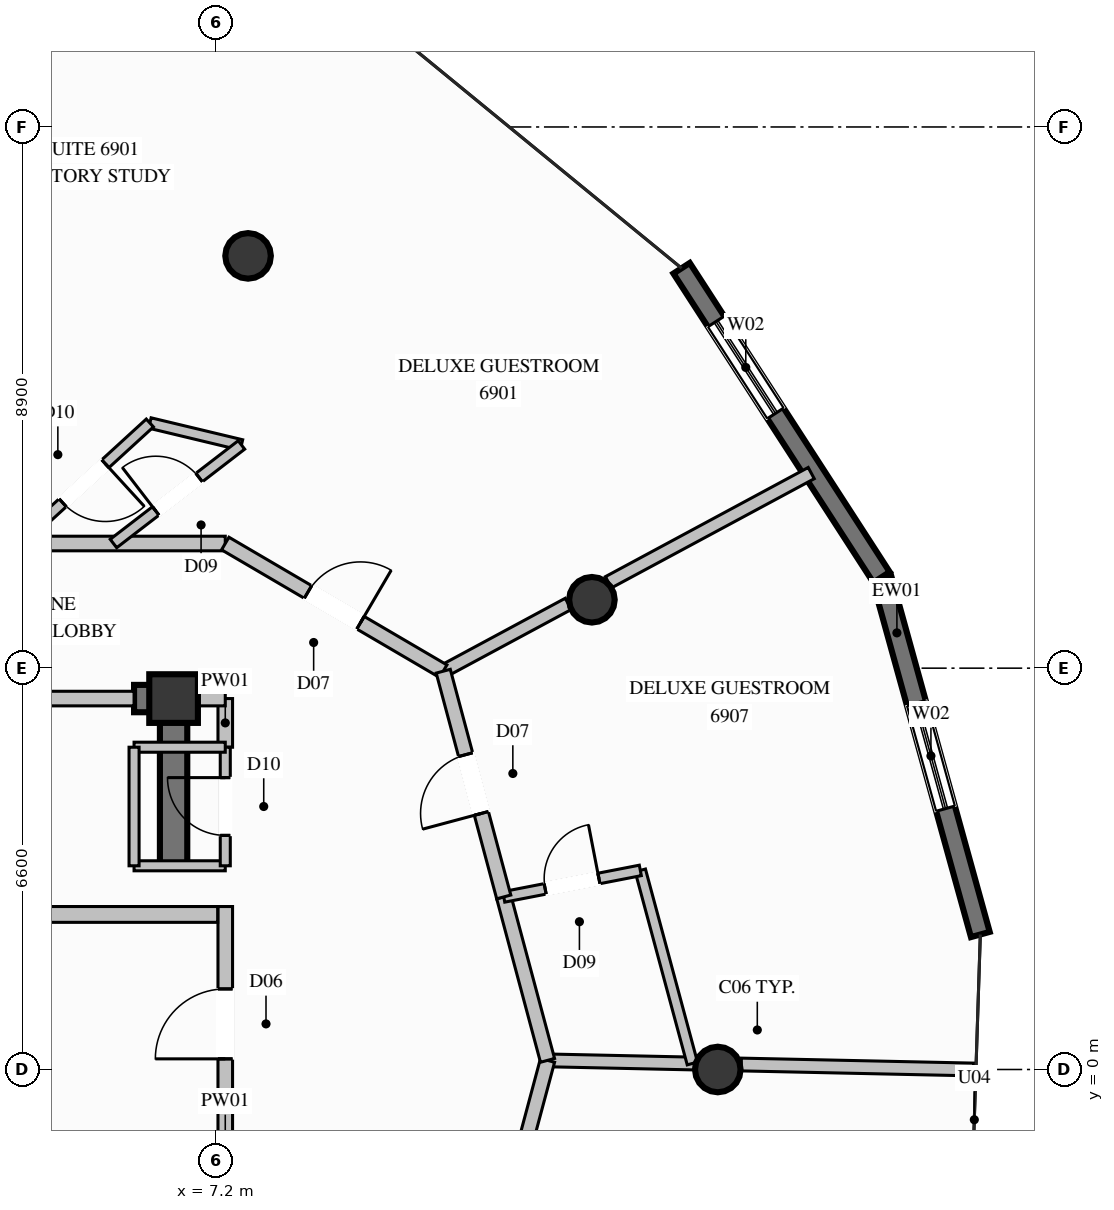
"""IFC4 building model, lengths in metres.
Left out: names, types, materials, properties, quantities, classifications, styles, units other than length and angle.
Written with IfcOpenShell. Run it as: python <this file> out.ifc"""

import sys

from ifc_helpers import new_model, si_unit, direction, frame, frame_2d, origin, origin_2d, place, context, subcontext, project, spatial, rectangle, circle, extrude, element, fill, save


model = new_model("IFC4")
c1 = context("Model", 3, precision=1e-05, world=origin(), true_north=direction((0.0, 1.0)))
c2 = subcontext(c1, "Body", "Model", "MODEL_VIEW")
j1 = project(units=[si_unit("LENGTHUNIT", "METRE"), si_unit("PLANEANGLEUNIT", "RADIAN")], contexts=[c1])
p1 = place(None, origin())
s1 = spatial("IfcSite", under=j1, at=p1, CompositionType="ELEMENT")
p2 = place(p1, origin())
s2 = spatial("IfcBuilding", under=s1, at=p2, CompositionType="ELEMENT")
p3 = place(p2, frame((0.0, 0.0, 258.2)))
s3 = spatial("IfcBuildingStorey", under=s2, at=p3, CompositionType="ELEMENT", Elevation=258.2)
p4 = place(p3, frame((6.5, 6.1, 0.0), z_axis=(0.0, 0.0, 1.0), x_axis=(1.0, 0.0, 0.0)))
e1 = element("IfcColumn", 1, at=p4, inside=s3, PredefinedType="COLUMN", context=c2, shape_type="SweptSolid", body=[
    extrude(rectangle(XDim=0.8, YDim=0.8, at=origin_2d()), origin(), (0.0, 0.0, 1.0), 3.8),
])
p5 = place(p3, frame((5.85, 6.1, 0.0), z_axis=(0.0, 0.0, 1.0), x_axis=(1.0, 0.0, 0.0)))
e2 = element("IfcWall", 2, at=p5, inside=s3, PredefinedType="SHEAR", context=c2, shape_type="SweptSolid", body=[
    extrude(rectangle(XDim=0.425, YDim=0.45, at=frame_2d((0.212, 0.0))), origin(), (0.0, 0.0, 1.0), 3.8),
])
p6 = place(p3, frame((6.5, 3.35, 0.0), z_axis=(0.0, 0.0, 1.0), x_axis=(0.0, 1.0, 0.0)))
e3 = element("IfcWall", 3, at=p6, inside=s3, PredefinedType="SHEAR", context=c2, shape_type="SweptSolid", body=[
    extrude(rectangle(XDim=2.975, YDim=0.45, at=frame_2d((1.487, 0.0))), origin(), (0.0, 0.0, 1.0), 3.8),
])
for number, where, z_axis, x_axis in (
    (4, (15.45, 0.0, 0.0), (0.0, 0.0, 1.0), (1.0, 0.0, 0.0)),
    (5, (13.38, 7.725, 0.0), (0.0, 0.0, 1.0), (1.0, 0.0, 0.0)),
    (6, (7.725, 13.38, 0.0), (0.0, 0.0, 1.0), (1.0, 0.0, 0.0)),
):
    element("IfcColumn", number, at=place(p3, frame(where, z_axis=z_axis, x_axis=x_axis)), inside=s3, PredefinedType="COLUMN", context=c2, shape_type="SweptSolid", body=[
        extrude(circle(Radius=0.375, at=origin_2d()), origin(), (0.0, 0.0, 1.0), 3.8),
    ])
p7 = place(p3, frame((18.143, 8.095, 0.0), z_axis=(0.0, 0.0, 1.0), x_axis=(0.266586054538, -0.963811120254, 0.0)))
e7 = element("IfcWall", 7, at=p7, inside=s3, PredefinedType="SOLIDWALL", context=c2, shape_type="SweptSolid", body=[
    extrude(rectangle(XDim=6.096, YDim=0.32, at=frame_2d((3.048, 0.0))), origin(), (0.0, 0.0, 1.0), 3.57),
])
p8 = place(p7, frame((2.148, 0.0, 0.35)))
e8 = element("IfcOpeningElement", 8, at=p8, cuts=e7, PredefinedType="OPENING", context=c2, shape_type="SweptSolid", body=[
    extrude(rectangle(XDim=1.8, YDim=2.6, at=frame_2d((0.9, 1.3))), frame((0.0, 0.17, 0.0), z_axis=(0.0, -1.0, 0.0), x_axis=(1.0, 0.0, 0.0)), (0.0, 0.0, 1.0), 0.34),
])
p9 = place(p3, frame((14.855, 13.177, 0.0), z_axis=(0.0, 0.0, 1.0), x_axis=(0.543217830049, -0.839591799101, 0.0)))
e9 = element("IfcWall", 9, at=p9, inside=s3, PredefinedType="SOLIDWALL", context=c2, shape_type="SweptSolid", body=[
    extrude(rectangle(XDim=6.053, YDim=0.32, at=frame_2d((3.026, 0.0))), origin(), (0.0, 0.0, 1.0), 3.57),
])
p10 = place(p9, frame((1.043, 0.0, 0.35)))
e10 = element("IfcOpeningElement", 10, at=p10, cuts=e9, PredefinedType="OPENING", context=c2, shape_type="SweptSolid", body=[
    extrude(rectangle(XDim=1.8, YDim=2.6, at=frame_2d((0.9, 1.3))), frame((0.0, 0.17, 0.0), z_axis=(0.0, -1.0, 0.0), x_axis=(1.0, 0.0, 0.0)), (0.0, 0.0, 1.0), 0.34),
])
p11 = place(p3, frame((7.35, -2.34, 0.0), z_axis=(0.0, 0.0, 1.0), x_axis=(0.0, 1.0, 0.0)))
e11 = element("IfcWall", 11, at=p11, inside=s3, PredefinedType="PARTITIONING", context=c2, shape_type="SweptSolid", body=[
    extrude(rectangle(XDim=5.02, YDim=0.24, at=frame_2d((2.51, 0.0))), origin(), (0.0, 0.0, 1.0), 2.655),
])
p12 = place(p11, frame((2.515, 0.0, 0.0)))
e12 = element("IfcOpeningElement", 12, at=p12, cuts=e11, PredefinedType="OPENING", context=c2, shape_type="SweptSolid", body=[
    extrude(rectangle(XDim=1.15, YDim=2.2, at=frame_2d((0.575, 1.1))), frame((0.0, 0.13, 0.0), z_axis=(0.0, -1.0, 0.0), x_axis=(1.0, 0.0, 0.0)), (0.0, 0.0, 1.0), 0.26),
])
p13 = place(p3, frame((4.13, 2.55, 0.0), z_axis=(0.0, 0.0, 1.0), x_axis=(1.0, 0.0, 0.0)))
e13 = element("IfcWall", 13, at=p13, inside=s3, PredefinedType="PARTITIONING", context=c2, shape_type="SweptSolid", body=[
    extrude(rectangle(XDim=3.095, YDim=0.26, at=frame_2d((1.548, 0.0))), origin(), (0.0, 0.0, 1.0), 3.57),
])
p14 = place(p3, frame((-5.75, 8.65, 0.0), z_axis=(0.0, 0.0, 1.0), x_axis=(1.0, 0.0, 0.0)))
e14 = element("IfcWall", 14, at=p14, inside=s3, PredefinedType="PARTITIONING", context=c2, shape_type="SweptSolid", body=[
    extrude(rectangle(XDim=13.1, YDim=0.24, at=frame_2d((6.55, 0.0))), origin(), (0.0, 0.0, 1.0), 3.57),
])
p15 = place(p3, frame((3.0, 6.1, 0.0), z_axis=(0.0, 0.0, 1.0), x_axis=(1.0, 0.0, 0.0)))
e15 = element("IfcWall", 15, at=p15, inside=s3, PredefinedType="PARTITIONING", context=c2, shape_type="SweptSolid", body=[
    extrude(rectangle(XDim=2.85, YDim=0.24, at=frame_2d((1.425, 0.0))), origin(), (0.0, 0.0, 1.0), 2.655),
])
p16 = place(p3, frame((7.35, 5.3, 0.0), z_axis=(0.0, 0.0, 1.0), x_axis=(0.0, 1.0, 0.0)))
e16 = element("IfcWall", 16, at=p16, inside=s3, PredefinedType="PARTITIONING", context=c2, shape_type="SweptSolid", body=[
    extrude(rectangle(XDim=0.8, YDim=0.24, at=frame_2d((0.4, 0.0))), origin(), (0.0, 0.0, 1.0), 2.655),
])
p17 = place(p3, frame((6.5, 6.1, 0.0), z_axis=(0.0, 0.0, 1.0), x_axis=(1.0, 0.0, 0.0)))
e17 = element("IfcWall", 17, at=p17, inside=s3, PredefinedType="PARTITIONING", context=c2, shape_type="SweptSolid", body=[
    extrude(rectangle(XDim=0.85, YDim=0.24, at=frame_2d((0.425, 0.0))), origin(), (0.0, 0.0, 1.0), 3.085),
])
p18 = place(p3, frame((5.85, 3.35, 0.0), z_axis=(0.0, 0.0, 1.0), x_axis=(1.0, 0.0, 0.0)))
e18 = element("IfcWall", 18, at=p18, inside=s3, PredefinedType="PARTITIONING", context=c2, shape_type="SweptSolid", body=[
    extrude(rectangle(XDim=1.5, YDim=0.165, at=frame_2d((0.75, 0.0))), origin(), (0.0, 0.0, 1.0), 3.57),
])
p19 = place(p3, frame((7.35, 3.35, 0.0), z_axis=(0.0, 0.0, 1.0), x_axis=(0.0, 1.0, 0.0)))
e19 = element("IfcWall", 19, at=p19, inside=s3, PredefinedType="PARTITIONING", context=c2, shape_type="SweptSolid", body=[
    extrude(rectangle(XDim=1.95, YDim=0.165, at=frame_2d((0.975, 0.0))), origin(), (0.0, 0.0, 1.0), 3.57),
])
p20 = place(p19, frame((0.5, 0.0, 0.0)))
e20 = element("IfcOpeningElement", 20, at=p20, cuts=e19, PredefinedType="OPENING", context=c2, shape_type="SweptSolid", body=[
    extrude(rectangle(XDim=0.95, YDim=2.1, at=frame_2d((0.475, 1.05))), frame((0.0, 0.093, 0.0), z_axis=(0.0, -1.0, 0.0), x_axis=(1.0, 0.0, 0.0)), (0.0, 0.0, 1.0), 0.185),
])
p21 = place(p3, frame((7.35, 5.3, 0.0), z_axis=(0.0, 0.0, 1.0), x_axis=(-1.0, 0.0, 0.0)))
e21 = element("IfcWall", 21, at=p21, inside=s3, PredefinedType="PARTITIONING", context=c2, shape_type="SweptSolid", body=[
    extrude(rectangle(XDim=1.5, YDim=0.165, at=frame_2d((0.75, 0.0))), origin(), (0.0, 0.0, 1.0), 2.655),
])
p22 = place(p3, frame((5.85, 5.3, 0.0), z_axis=(0.0, 0.0, 1.0), x_axis=(0.0, -1.0, 0.0)))
e22 = element("IfcWall", 22, at=p22, inside=s3, PredefinedType="PARTITIONING", context=c2, shape_type="SweptSolid", body=[
    extrude(rectangle(XDim=1.95, YDim=0.165, at=frame_2d((0.975, 0.0))), origin(), (0.0, 0.0, 1.0), 2.655),
])
p23 = place(p3, frame((12.65, 0.15, 0.0), z_axis=(0.0, 0.0, 1.0), x_axis=(0.999768629451, -0.021510173543, 0.0)))
e23 = element("IfcWall", 23, at=p23, inside=s3, PredefinedType="PARTITIONING", context=c2, shape_type="SweptSolid", body=[
    extrude(rectangle(XDim=2.417, YDim=0.21, at=frame_2d((1.209, 0.0))), origin(), (0.0, 0.0, 1.0), 3.57),
])
p24 = place(p3, frame((15.836, 0.082, 0.0), z_axis=(0.0, 0.0, 1.0), x_axis=(0.999769518417, -0.021468815632, 0.0)))
e24 = element("IfcWall", 24, at=p24, inside=s3, PredefinedType="PARTITIONING", context=c2, shape_type="SweptSolid", body=[
    extrude(rectangle(XDim=3.821, YDim=0.21, at=frame_2d((1.911, 0.0))), origin(), (0.0, 0.0, 1.0), 3.57),
])
p25 = place(p3, frame((10.935, 6.55, 0.0), z_axis=(0.0, 0.0, 1.0), x_axis=(0.8804878863, 0.474068647011, 0.0)))
e25 = element("IfcWall", 25, at=p25, inside=s3, PredefinedType="PARTITIONING", context=c2, shape_type="SweptSolid", body=[
    extrude(rectangle(XDim=2.335, YDim=0.21, at=frame_2d((1.167, 0.0))), origin(), (0.0, 0.0, 1.0), 3.085),
])
p26 = place(p3, frame((13.651, 8.012, 0.0), z_axis=(0.0, 0.0, 1.0), x_axis=(0.880500064333, 0.47404602805, 0.0)))
e26 = element("IfcWall", 26, at=p26, inside=s3, PredefinedType="PARTITIONING", context=c2, shape_type="SweptSolid", body=[
    extrude(rectangle(XDim=3.789, YDim=0.21, at=frame_2d((1.895, 0.0))), origin(), (0.0, 0.0, 1.0), 3.57),
])
p27 = place(p3, frame((6.11, 10.632, 0.0), z_axis=(0.0, 0.0, 1.0), x_axis=(0.972434507915, -0.233176173347, 0.0)))
e27 = element("IfcWall", 27, at=p27, inside=s3, PredefinedType="PLUMBINGWALL", context=c2, shape_type="SweptSolid", body=[
    extrude(rectangle(XDim=1.549, YDim=0.175, at=frame_2d((0.774, 0.0))), origin(), (0.0, 0.0, 1.0), 3.57),
])
p28 = place(p3, frame((6.11, 10.632, 0.0), z_axis=(0.0, 0.0, 1.0), x_axis=(-0.737719939181, -0.675106874009, 0.0)))
e28 = element("IfcWall", 28, at=p28, inside=s3, PredefinedType="PLUMBINGWALL", context=c2, shape_type="SweptSolid", body=[
    extrude(rectangle(XDim=2.936, YDim=0.175, at=frame_2d((1.468, 0.0))), origin(), (0.0, 0.0, 1.0), 3.57),
])
p29 = place(p28, frame((0.993, 0.0, 0.0)))
e29 = element("IfcOpeningElement", 29, at=p29, cuts=e28, PredefinedType="OPENING", context=c2, shape_type="SweptSolid", body=[
    extrude(rectangle(XDim=0.95, YDim=2.1, at=frame_2d((0.475, 1.05))), frame((0.0, 0.098, 0.0), z_axis=(0.0, -1.0, 0.0), x_axis=(1.0, 0.0, 0.0)), (0.0, 0.0, 1.0), 0.195),
])
p30 = place(p3, frame((5.511, 8.65, 0.0), z_axis=(0.0, 0.0, 1.0), x_axis=(0.792282263308, 0.610154746969, 0.0)))
e30 = element("IfcWall", 30, at=p30, inside=s3, PredefinedType="PLUMBINGWALL", context=c2, shape_type="SweptSolid", body=[
    extrude(rectangle(XDim=2.657, YDim=0.175, at=frame_2d((1.328, 0.0))), origin(), (0.0, 0.0, 1.0), 3.57),
])
p31 = place(p30, frame((0.878, 0.0, 0.0)))
e31 = element("IfcOpeningElement", 31, at=p31, cuts=e30, PredefinedType="OPENING", context=c2, shape_type="SweptSolid", body=[
    extrude(rectangle(XDim=0.9, YDim=2.1, at=frame_2d((0.45, 1.05))), frame((0.0, 0.098, 0.0), z_axis=(0.0, -1.0, 0.0), x_axis=(1.0, 0.0, 0.0)), (0.0, 0.0, 1.0), 0.195),
])
p32 = place(p3, frame((7.35, 8.65, 0.0), z_axis=(0.0, 0.0, 1.0), x_axis=(0.862873842462, -0.505419362505, 0.0)))
e32 = element("IfcWall", 32, at=p32, inside=s3, PredefinedType="PARTITIONING", context=c2, shape_type="SweptSolid", body=[
    extrude(rectangle(XDim=4.155, YDim=0.24, at=frame_2d((2.077, 0.0))), origin(), (0.0, 0.0, 1.0), 3.57),
])
p33 = place(p32, frame((1.577, 0.0, 0.0)))
e33 = element("IfcOpeningElement", 33, at=p33, cuts=e32, PredefinedType="OPENING", context=c2, shape_type="SweptSolid", body=[
    extrude(rectangle(XDim=1.0, YDim=2.2, at=frame_2d((0.5, 1.1))), frame((0.0, 0.13, 0.0), z_axis=(0.0, -1.0, 0.0), x_axis=(1.0, 0.0, 0.0)), (0.0, 0.0, 1.0), 0.26),
])
p34 = place(p3, frame((11.655, -3.562, 0.0), z_axis=(0.0, 0.0, 1.0), x_axis=(0.258884274469, 0.965908345772, 0.0)))
e34 = element("IfcWall", 34, at=p34, inside=s3, PredefinedType="PARTITIONING", context=c2, shape_type="SweptSolid", body=[
    extrude(rectangle(XDim=3.843, YDim=0.24, at=frame_2d((1.921, 0.0))), origin(), (0.0, 0.0, 1.0), 3.57),
])
p35 = place(p34, frame((1.422, 0.0, 0.0)))
e35 = element("IfcOpeningElement", 35, at=p35, cuts=e34, PredefinedType="OPENING", context=c2, shape_type="SweptSolid", body=[
    extrude(rectangle(XDim=1.0, YDim=2.2, at=frame_2d((0.5, 1.1))), frame((0.0, 0.13, 0.0), z_axis=(0.0, -1.0, 0.0), x_axis=(1.0, 0.0, 0.0)), (0.0, 0.0, 1.0), 0.26),
])
p36 = place(p3, frame((12.65, 0.15, 0.0), z_axis=(0.0, 0.0, 1.0), x_axis=(-0.258727314432, 0.96595040078, 0.0)))
e36 = element("IfcWall", 36, at=p36, inside=s3, PredefinedType="PARTITIONING", context=c2, shape_type="SweptSolid", body=[
    extrude(rectangle(XDim=2.783, YDim=0.24, at=frame_2d((1.391, 0.0))), origin(), (0.0, 0.0, 1.0), 3.57),
])
p37 = place(p3, frame((15.032, 0.099, 0.0), z_axis=(0.0, 0.0, 1.0), x_axis=(-0.260314282217, 0.965523937805, 0.0)))
e37 = element("IfcWall", 37, at=p37, inside=s3, PredefinedType="PLUMBINGWALL", context=c2, shape_type="SweptSolid", body=[
    extrude(rectangle(XDim=3.288, YDim=0.175, at=frame_2d((1.644, 0.0))), origin(), (0.0, 0.0, 1.0), 3.137),
])
p38 = place(p3, frame((11.93, 2.838, 0.0), z_axis=(0.0, 0.0, 1.0), x_axis=(0.98167309954, 0.190572625628, 0.0)))
e38 = element("IfcWall", 38, at=p38, inside=s3, PredefinedType="PLUMBINGWALL", context=c2, shape_type="SweptSolid", body=[
    extrude(rectangle(XDim=2.288, YDim=0.175, at=frame_2d((1.144, 0.0))), origin(), (0.0, 0.0, 1.0), 3.57),
])
p39 = place(p38, frame((0.694, 0.0, 0.0)))
e39 = element("IfcOpeningElement", 39, at=p39, cuts=e38, PredefinedType="OPENING", context=c2, shape_type="SweptSolid", body=[
    extrude(rectangle(XDim=0.9, YDim=2.1, at=frame_2d((0.45, 1.05))), frame((0.0, 0.098, 0.0), z_axis=(0.0, -1.0, 0.0), x_axis=(1.0, 0.0, 0.0)), (0.0, 0.0, 1.0), 0.195),
])
p40 = place(p3, frame((11.93, 2.838, 0.0), z_axis=(0.0, 0.0, 1.0), x_axis=(-0.258868389222, 0.965912603221, 0.0)))
e40 = element("IfcWall", 40, at=p40, inside=s3, PredefinedType="PARTITIONING", context=c2, shape_type="SweptSolid", body=[
    extrude(rectangle(XDim=3.843, YDim=0.24, at=frame_2d((1.922, 0.0))), origin(), (0.0, 0.0, 1.0), 3.57),
])
p41 = place(p40, frame((1.422, 0.0, 0.0)))
e41 = element("IfcOpeningElement", 41, at=p41, cuts=e40, PredefinedType="OPENING", context=c2, shape_type="SweptSolid", body=[
    extrude(rectangle(XDim=1.0, YDim=2.2, at=frame_2d((0.5, 1.1))), frame((0.0, 0.13, 0.0), z_axis=(0.0, -1.0, 0.0), x_axis=(1.0, 0.0, 0.0)), (0.0, 0.0, 1.0), 0.26),
])
p42 = place(p8, origin())
e42 = element("IfcWindow", 42, at=p42, inside=s3, PartitioningType="SINGLE_PANEL", PredefinedType="WINDOW", context=c2, shape_type="SweptSolid", body=[
    extrude(rectangle(XDim=1.8, YDim=2.6, at=frame_2d((0.9, 1.3))), frame((0.0, 0.03, 0.0), z_axis=(0.0, -1.0, 0.0), x_axis=(1.0, 0.0, 0.0)), (0.0, 0.0, 1.0), 0.06),
])
fill(e8, e42)
p43 = place(p10, origin())
e43 = element("IfcWindow", 43, at=p43, inside=s3, PartitioningType="SINGLE_PANEL", PredefinedType="WINDOW", context=c2, shape_type="SweptSolid", body=[
    extrude(rectangle(XDim=1.8, YDim=2.6, at=frame_2d((0.9, 1.3))), frame((0.0, 0.03, 0.0), z_axis=(0.0, -1.0, 0.0), x_axis=(1.0, 0.0, 0.0)), (0.0, 0.0, 1.0), 0.06),
])
fill(e10, e43)
p44 = place(p12, origin())
e44 = element("IfcDoor", 44, at=p44, inside=s3, OperationType="SINGLE_SWING_LEFT", PredefinedType="DOOR", context=c2, shape_type="SweptSolid", body=[
    extrude(rectangle(XDim=1.15, YDim=2.2, at=frame_2d((0.575, 1.1))), frame((0.0, 0.025, 0.0), z_axis=(0.0, -1.0, 0.0), x_axis=(1.0, 0.0, 0.0)), (0.0, 0.0, 1.0), 0.05),
])
fill(e12, e44)
p45 = place(p20, origin())
e45 = element("IfcDoor", 45, at=p45, inside=s3, OperationType="SINGLE_SWING_RIGHT", PredefinedType="DOOR", context=c2, shape_type="SweptSolid", body=[
    extrude(rectangle(XDim=0.95, YDim=2.1, at=frame_2d((0.475, 1.05))), frame((0.0, 0.025, 0.0), z_axis=(0.0, -1.0, 0.0), x_axis=(1.0, 0.0, 0.0)), (0.0, 0.0, 1.0), 0.05),
])
fill(e20, e45)
p46 = place(p31, origin())
e46 = element("IfcDoor", 46, at=p46, inside=s3, OperationType="SINGLE_SWING_LEFT", PredefinedType="DOOR", context=c2, shape_type="SweptSolid", body=[
    extrude(rectangle(XDim=0.9, YDim=2.1, at=frame_2d((0.45, 1.05))), frame((0.0, 0.025, 0.0), z_axis=(0.0, -1.0, 0.0), x_axis=(1.0, 0.0, 0.0)), (0.0, 0.0, 1.0), 0.05),
])
fill(e31, e46)
p47 = place(p33, origin())
e47 = element("IfcDoor", 47, at=p47, inside=s3, OperationType="SINGLE_SWING_RIGHT", PredefinedType="DOOR", context=c2, shape_type="SweptSolid", body=[
    extrude(rectangle(XDim=1.0, YDim=2.2, at=frame_2d((0.5, 1.1))), frame((0.0, 0.025, 0.0), z_axis=(0.0, -1.0, 0.0), x_axis=(1.0, 0.0, 0.0)), (0.0, 0.0, 1.0), 0.05),
])
fill(e33, e47)
p48 = place(p29, origin())
e48 = element("IfcDoor", 48, at=p48, inside=s3, OperationType="SINGLE_SWING_LEFT", PredefinedType="DOOR", context=c2, shape_type="SweptSolid", body=[
    extrude(rectangle(XDim=0.95, YDim=2.1, at=frame_2d((0.475, 1.05))), frame((0.0, 0.025, 0.0), z_axis=(0.0, -1.0, 0.0), x_axis=(1.0, 0.0, 0.0)), (0.0, 0.0, 1.0), 0.05),
])
fill(e29, e48)
p49 = place(p39, origin())
e49 = element("IfcDoor", 49, at=p49, inside=s3, OperationType="SINGLE_SWING_RIGHT", PredefinedType="DOOR", context=c2, shape_type="SweptSolid", body=[
    extrude(rectangle(XDim=0.9, YDim=2.1, at=frame_2d((0.45, 1.05))), frame((0.0, 0.025, 0.0), z_axis=(0.0, -1.0, 0.0), x_axis=(1.0, 0.0, 0.0)), (0.0, 0.0, 1.0), 0.05),
])
fill(e39, e49)
p50 = place(p41, origin())
e50 = element("IfcDoor", 50, at=p50, inside=s3, OperationType="SINGLE_SWING_LEFT", PredefinedType="DOOR", context=c2, shape_type="SweptSolid", body=[
    extrude(rectangle(XDim=1.0, YDim=2.2, at=frame_2d((0.5, 1.1))), frame((0.0, 0.025, 0.0), z_axis=(0.0, -1.0, 0.0), x_axis=(1.0, 0.0, 0.0)), (0.0, 0.0, 1.0), 0.05),
])
fill(e41, e50)
save(model, sys.argv[1])
